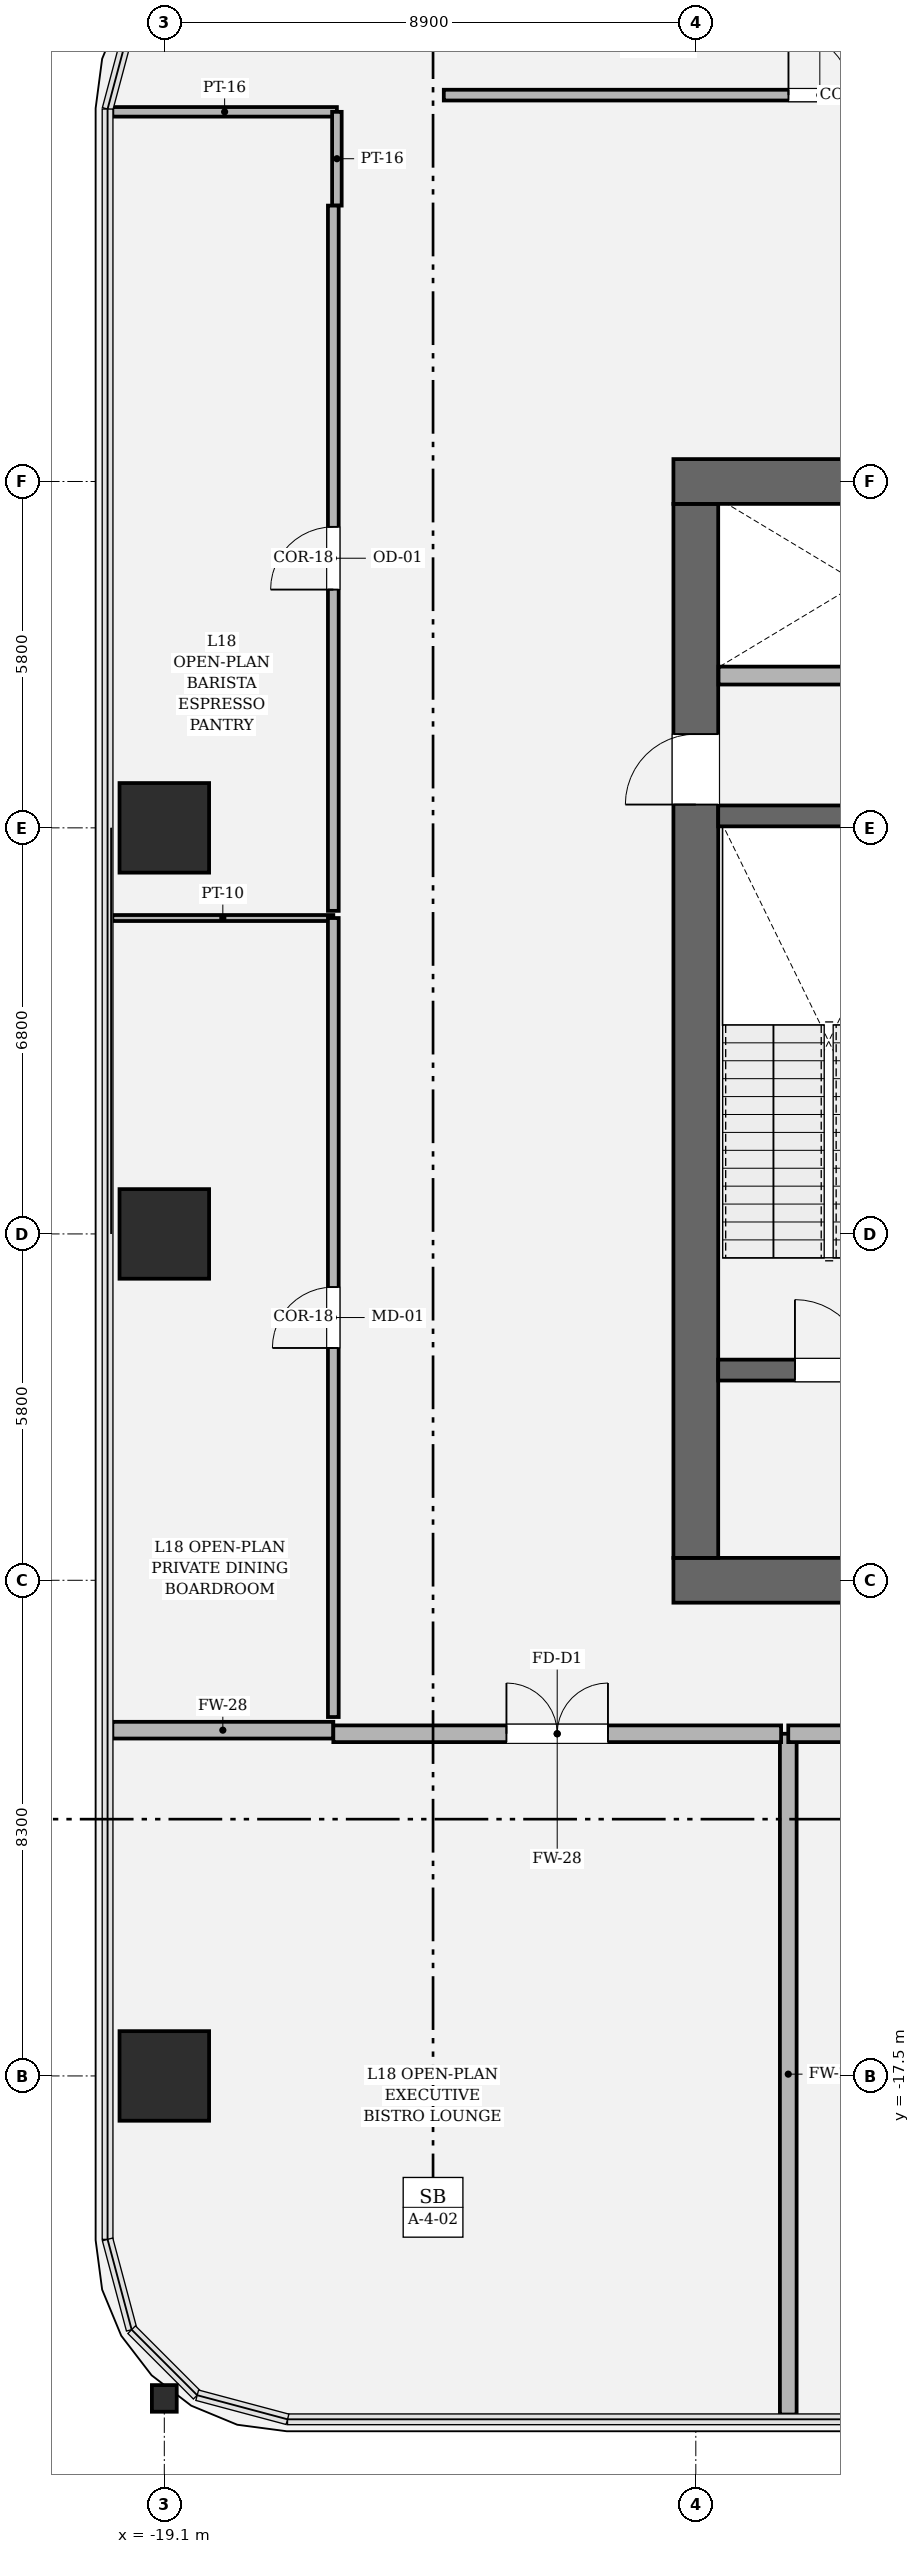
"""IFC4 building model, lengths in metres.
Left out: names, types, materials, properties, quantities, classifications, styles, units other than length and angle.
Written with IfcOpenShell. Run it as: python <this file> out.ifc"""

import sys

from ifc_helpers import new_model, si_unit, direction, frame, frame_2d, origin, origin_2d, place, context, subcontext, project, spatial, rectangle, hollow_rectangle, i_section, extrude, element, fill, save


model = new_model("IFC4")
c1 = context("Model", 3, precision=1e-05, world=origin(), true_north=direction((0.0, 1.0)))
c2 = subcontext(c1, "Body", "Model", "MODEL_VIEW")
j1 = project(units=[si_unit("LENGTHUNIT", "METRE"), si_unit("PLANEANGLEUNIT", "RADIAN")], contexts=[c1])
p1 = place(None, origin())
s1 = spatial("IfcSite", under=j1, at=p1, CompositionType="ELEMENT")
p2 = place(p1, origin())
s2 = spatial("IfcBuilding", under=s1, at=p2, CompositionType="ELEMENT")
p3 = place(p2, frame((0.0, 0.0, 80.85)))
s3 = spatial("IfcBuildingStorey", under=s2, at=p3, CompositionType="ELEMENT", Elevation=80.85)
p4 = place(p3, frame((10.575, -9.2, 0.0), z_axis=(0.0, 0.0, 1.0), x_axis=(-1.0, 0.0, 0.0)))
e1 = element("IfcWall", 1, at=p4, inside=s3, PredefinedType="SHEAR", context=c2, shape_type="SweptSolid", body=[
    extrude(rectangle(XDim=21.15, YDim=0.75, at=frame_2d((10.575, 0.0))), origin(), (0.0, 0.0, 1.0), 4.05),
])
p5 = place(p4, frame((2.85, 0.0, 0.0)))
e2 = element("IfcOpeningElement", 2, at=p5, cuts=e1, PredefinedType="OPENING", context=c2, shape_type="SweptSolid", body=[
    extrude(rectangle(XDim=1.25, YDim=2.25, at=frame_2d((0.625, 1.125))), frame((0.0, 0.385, 0.0), z_axis=(0.0, -1.0, 0.0), x_axis=(1.0, 0.0, 0.0)), (0.0, 0.0, 1.0), 0.77),
])
p6 = place(p4, frame((17.05, 0.0, 0.0)))
e3 = element("IfcOpeningElement", 3, at=p6, cuts=e1, PredefinedType="OPENING", context=c2, shape_type="SweptSolid", body=[
    extrude(rectangle(XDim=1.25, YDim=2.25, at=frame_2d((0.625, 1.125))), frame((0.0, 0.385, 0.0), z_axis=(0.0, -1.0, 0.0), x_axis=(1.0, 0.0, 0.0)), (0.0, 0.0, 1.0), 0.77),
])
p7 = place(p3, frame((-10.2, -8.825, 0.0), z_axis=(0.0, 0.0, 1.0), x_axis=(0.0, 1.0, 0.0)))
e4 = element("IfcWall", 4, at=p7, inside=s3, PredefinedType="SHEAR", context=c2, shape_type="SweptSolid", body=[
    extrude(rectangle(XDim=17.65, YDim=0.75, at=frame_2d((8.825, 0.0))), origin(), (0.0, 0.0, 1.0), 4.05),
])
p8 = place(p7, frame((12.615, 0.0, 0.0)))
e5 = element("IfcOpeningElement", 5, at=p8, cuts=e4, PredefinedType="OPENING", context=c2, shape_type="SweptSolid", body=[
    extrude(rectangle(XDim=1.18, YDim=2.2, at=frame_2d((0.59, 1.1))), frame((0.0, 0.385, 0.0), z_axis=(0.0, -1.0, 0.0), x_axis=(1.0, 0.0, 0.0)), (0.0, 0.0, 1.0), 0.77),
])
p9 = place(p3, frame((-10.575, 9.2, 0.0), z_axis=(0.0, 0.0, 1.0), x_axis=(1.0, 0.0, 0.0)))
e6 = element("IfcWall", 6, at=p9, inside=s3, PredefinedType="SHEAR", context=c2, shape_type="SweptSolid", body=[
    extrude(rectangle(XDim=21.15, YDim=0.75, at=frame_2d((10.575, 0.0))), origin(), (0.0, 0.0, 1.0), 4.05),
])
p10 = place(p3, frame((-9.825, -5.68, 0.0), z_axis=(0.0, 0.0, 1.0), x_axis=(1.0, 0.0, 0.0)))
e7 = element("IfcWall", 7, at=p10, inside=s3, PredefinedType="SOLIDWALL", context=c2, shape_type="SweptSolid", body=[
    extrude(rectangle(XDim=5.175, YDim=0.35, at=frame_2d((2.587, 0.0))), origin(), (0.0, 0.0, 1.0), 4.05),
])
p11 = place(p10, frame((1.285, 0.0, 0.0)))
e8 = element("IfcOpeningElement", 8, at=p11, cuts=e7, PredefinedType="OPENING", context=c2, shape_type="SweptSolid", body=[
    extrude(rectangle(XDim=1.18, YDim=2.2, at=frame_2d((0.59, 1.1))), frame((0.0, 0.185, 0.0), z_axis=(0.0, -1.0, 0.0), x_axis=(1.0, 0.0, 0.0)), (0.0, 0.0, 1.0), 0.37),
])
p12 = place(p3, frame((-9.825, 3.6, 0.0), z_axis=(0.0, 0.0, 1.0), x_axis=(1.0, 0.0, 0.0)))
e9 = element("IfcWall", 9, at=p12, inside=s3, PredefinedType="SOLIDWALL", context=c2, shape_type="SweptSolid", body=[
    extrude(rectangle(XDim=5.175, YDim=0.35, at=frame_2d((2.587, 0.0))), origin(), (0.0, 0.0, 1.0), 4.05),
])
for number, where, z_axis, x_axis in (
    (10, (-19.1, -17.5, 0.0), (0.0, 0.0, 1.0), (1.0, 0.0, 0.0)),
    (11, (-19.1, 3.4, 0.0), (0.0, 0.0, 1.0), (1.0, 0.0, 0.0)),
    (12, (-19.1, -3.4, 0.0), (0.0, 0.0, 1.0), (1.0, 0.0, 0.0)),
):
    element("IfcColumn", number, at=place(p3, frame(where, z_axis=z_axis, x_axis=x_axis)), inside=s3, PredefinedType="COLUMN", context=c2, shape_type="SweptSolid", body=[
        extrude(hollow_rectangle(XDim=1.5, YDim=1.5, WallThickness=0.045, at=origin_2d()), origin(), (0.0, 0.0, 1.0), 4.05),
    ])
p13 = place(p3, frame((-19.1, -22.9, 0.0), z_axis=(0.0, 0.0, 1.0), x_axis=(1.0, 0.0, 0.0)))
e13 = element("IfcColumn", 13, at=p13, inside=s3, PredefinedType="COLUMN", context=c2, shape_type="SweptSolid", body=[
    extrude(i_section(OverallWidth=0.416, OverallDepth=0.446, WebThickness=0.039, FlangeThickness=0.062, FilletRadius=0.018, at=origin_2d()), origin(), (0.0, 0.0, 1.0), 4.048),
])
p14 = place(p3, frame((-9.82, 5.95, 0.0), z_axis=(0.0, 0.0, 1.0), x_axis=(1.0, 0.0, 0.0)))
e14 = element("IfcWall", 14, at=p14, inside=s3, PredefinedType="SOLIDWALL", context=c2, shape_type="SweptSolid", body=[
    extrude(rectangle(XDim=4.76, YDim=0.3, at=frame_2d((2.38, 0.0))), origin(), (0.0, 0.0, 1.0), 3.81),
])
p15 = place(p3, frame((-8.652, -23.17, 0.0), z_axis=(0.0, 0.0, 1.0), x_axis=(0.0, 1.0, 0.0)))
e15 = element("IfcWall", 15, at=p15, inside=s3, PredefinedType="SOLIDWALL", context=c2, shape_type="SweptSolid", body=[
    extrude(rectangle(XDim=11.4, YDim=0.28, at=frame_2d((5.7, 0.0))), origin(), (0.0, 0.0, 1.0), 2.524),
])
p16 = place(p3, frame((-8.652, -11.77, 0.0), z_axis=(0.0, 0.0, 1.0), x_axis=(1.0, 0.0, 0.0)))
e16 = element("IfcWall", 16, at=p16, inside=s3, PredefinedType="SOLIDWALL", context=c2, shape_type="SweptSolid", body=[
    extrude(rectangle(XDim=13.77, YDim=0.28, at=frame_2d((6.885, 0.0))), origin(), (0.0, 0.0, 1.0), 3.104),
])
p17 = place(p16, frame((6.035, 0.0, 0.0)))
e17 = element("IfcOpeningElement", 17, at=p17, cuts=e16, PredefinedType="OPENING", context=c2, shape_type="SweptSolid", body=[
    extrude(rectangle(XDim=1.7, YDim=2.3, at=frame_2d((0.85, 1.15))), frame((0.0, 0.15, 0.0), z_axis=(0.0, -1.0, 0.0), x_axis=(1.0, 0.0, 0.0)), (0.0, 0.0, 1.0), 0.3),
])
p18 = place(p3, frame((-19.97, -11.71, 0.0), z_axis=(0.0, 0.0, 1.0), x_axis=(1.0, 0.0, 0.0)))
e18 = element("IfcWall", 18, at=p18, inside=s3, PredefinedType="SOLIDWALL", context=c2, shape_type="SweptSolid", body=[
    extrude(rectangle(XDim=3.7, YDim=0.28, at=frame_2d((1.85, 0.0))), origin(), (0.0, 0.0, 1.0), 3.104),
])
p19 = place(p3, frame((-16.27, -11.77, 0.0), z_axis=(0.0, 0.0, 1.0), x_axis=(1.0, 0.0, 0.0)))
e19 = element("IfcWall", 19, at=p19, inside=s3, PredefinedType="SOLIDWALL", context=c2, shape_type="SweptSolid", body=[
    extrude(rectangle(XDim=7.498, YDim=0.28, at=frame_2d((3.749, 0.0))), origin(), (0.0, 0.0, 1.0), 3.104),
])
p20 = place(p19, frame((2.899, 0.0, 0.0)))
e20 = element("IfcOpeningElement", 20, at=p20, cuts=e19, PredefinedType="OPENING", context=c2, shape_type="SweptSolid", body=[
    extrude(rectangle(XDim=1.7, YDim=2.3, at=frame_2d((0.85, 1.15))), frame((0.0, 0.15, 0.0), z_axis=(0.0, -1.0, 0.0), x_axis=(1.0, 0.0, 0.0)), (0.0, 0.0, 1.0), 0.3),
])
p21 = place(p3, frame((-19.97, 1.89, 0.0), z_axis=(0.0, 0.0, 1.0), x_axis=(1.0, 0.0, 0.0)))
e21 = element("IfcWall", 21, at=p21, inside=s3, PredefinedType="PARTITIONING", context=c2, shape_type="SweptSolid", body=[
    extrude(rectangle(XDim=3.7, YDim=0.1, at=frame_2d((1.85, 0.0))), origin(), (0.0, 0.0, 1.0), 3.104),
])
p22 = place(p3, frame((-16.27, 1.89, 0.0), z_axis=(0.0, 0.0, 1.0), x_axis=(0.0, -1.0, 0.0)))
e22 = element("IfcWall", 22, at=p22, inside=s3, PredefinedType="PARTITIONING", context=c2, shape_type="SweptSolid", body=[
    extrude(rectangle(XDim=13.38, YDim=0.18, at=frame_2d((6.69, 0.0))), origin(), (0.0, 0.0, 1.0), 3.104),
])
p23 = place(p22, frame((6.18, 0.0, 0.0)))
e23 = element("IfcOpeningElement", 23, at=p23, cuts=e22, PredefinedType="OPENING", context=c2, shape_type="SweptSolid", body=[
    extrude(rectangle(XDim=1.02, YDim=2.2, at=frame_2d((0.51, 1.1))), frame((0.0, 0.1, 0.0), z_axis=(0.0, -1.0, 0.0), x_axis=(1.0, 0.0, 0.0)), (0.0, 0.0, 1.0), 0.2),
])
p24 = place(p3, frame((-19.97, 15.39, 0.0), z_axis=(0.0, 0.0, 1.0), x_axis=(1.0, 0.0, 0.0)))
e24 = element("IfcWall", 24, at=p24, inside=s3, PredefinedType="PARTITIONING", context=c2, shape_type="SweptSolid", body=[
    extrude(rectangle(XDim=3.76, YDim=0.16, at=frame_2d((1.88, 0.0))), origin(), (0.0, 0.0, 1.0), 3.104),
])
p25 = place(p3, frame((-16.21, 15.39, 0.0), z_axis=(0.0, 0.0, 1.0), x_axis=(0.0, -1.0, 0.0)))
e25 = element("IfcWall", 25, at=p25, inside=s3, PredefinedType="PARTITIONING", context=c2, shape_type="SweptSolid", body=[
    extrude(rectangle(XDim=1.57, YDim=0.16, at=frame_2d((0.785, 0.0))), origin(), (0.0, 0.0, 1.0), 3.81),
])
p26 = place(p3, frame((-16.27, 13.82, 0.0), z_axis=(0.0, 0.0, 1.0), x_axis=(0.0, -1.0, 0.0)))
e26 = element("IfcWall", 26, at=p26, inside=s3, PredefinedType="PARTITIONING", context=c2, shape_type="SweptSolid", body=[
    extrude(rectangle(XDim=11.81, YDim=0.18, at=frame_2d((5.905, 0.0))), origin(), (0.0, 0.0, 1.0), 3.104),
])
p27 = place(p26, frame((5.38, 0.0, 0.0)))
e27 = element("IfcOpeningElement", 27, at=p27, cuts=e26, PredefinedType="OPENING", context=c2, shape_type="SweptSolid", body=[
    extrude(rectangle(XDim=1.05, YDim=2.2, at=frame_2d((0.525, 1.1))), frame((0.0, 0.1, 0.0), z_axis=(0.0, -1.0, 0.0), x_axis=(1.0, 0.0, 0.0)), (0.0, 0.0, 1.0), 0.2),
])
p28 = place(p3, frame((-1.827, 15.67, 0.0), z_axis=(0.0, 0.0, 1.0), x_axis=(-1.0, 0.0, 0.0)))
e28 = element("IfcWall", 28, at=p28, inside=s3, PredefinedType="PARTITIONING", context=c2, shape_type="SweptSolid", body=[
    extrude(rectangle(XDim=12.593, YDim=0.18, at=frame_2d((6.296, 0.0))), origin(), (0.0, 0.0, 1.0), 3.104),
])
p29 = place(p28, frame((5.771, 0.0, 0.0)))
e29 = element("IfcOpeningElement", 29, at=p29, cuts=e28, PredefinedType="OPENING", context=c2, shape_type="SweptSolid", body=[
    extrude(rectangle(XDim=1.05, YDim=2.2, at=frame_2d((0.525, 1.1))), frame((0.0, 0.1, 0.0), z_axis=(0.0, -1.0, 0.0), x_axis=(1.0, 0.0, 0.0)), (0.0, 0.0, 1.0), 0.2),
])
p30 = place(p11, origin())
e30 = element("IfcDoor", 30, at=p30, inside=s3, OperationType="SINGLE_SWING_LEFT", PredefinedType="DOOR", context=c2, shape_type="SweptSolid", body=[
    extrude(rectangle(XDim=1.18, YDim=2.2, at=frame_2d((0.59, 1.1))), frame((0.0, 0.025, 0.0), z_axis=(0.0, -1.0, 0.0), x_axis=(1.0, 0.0, 0.0)), (0.0, 0.0, 1.0), 0.05),
])
fill(e8, e30)
p31 = place(p8, origin())
e31 = element("IfcDoor", 31, at=p31, inside=s3, OperationType="SINGLE_SWING_LEFT", PredefinedType="DOOR", context=c2, shape_type="SweptSolid", body=[
    extrude(rectangle(XDim=1.18, YDim=2.2, at=frame_2d((0.59, 1.1))), frame((0.0, 0.025, 0.0), z_axis=(0.0, -1.0, 0.0), x_axis=(1.0, 0.0, 0.0)), (0.0, 0.0, 1.0), 0.05),
])
fill(e5, e31)
p32 = place(p20, origin())
e32 = element("IfcDoor", 32, at=p32, inside=s3, OperationType="DOUBLE_DOOR_SINGLE_SWING", PredefinedType="DOOR", context=c2, shape_type="SweptSolid", body=[
    extrude(rectangle(XDim=1.7, YDim=2.3, at=frame_2d((0.85, 1.15))), frame((0.0, 0.025, 0.0), z_axis=(0.0, -1.0, 0.0), x_axis=(1.0, 0.0, 0.0)), (0.0, 0.0, 1.0), 0.05),
])
fill(e20, e32)
p33 = place(p23, origin())
e33 = element("IfcDoor", 33, at=p33, inside=s3, OperationType="SINGLE_SWING_RIGHT", PredefinedType="DOOR", context=c2, shape_type="SweptSolid", body=[
    extrude(rectangle(XDim=1.02, YDim=2.2, at=frame_2d((0.51, 1.1))), frame((0.0, 0.025, 0.0), z_axis=(0.0, -1.0, 0.0), x_axis=(1.0, 0.0, 0.0)), (0.0, 0.0, 1.0), 0.05),
])
fill(e23, e33)
p34 = place(p27, origin())
e34 = element("IfcDoor", 34, at=p34, inside=s3, OperationType="SINGLE_SWING_RIGHT", PredefinedType="DOOR", context=c2, shape_type="SweptSolid", body=[
    extrude(rectangle(XDim=1.05, YDim=2.2, at=frame_2d((0.525, 1.1))), frame((0.0, 0.025, 0.0), z_axis=(0.0, -1.0, 0.0), x_axis=(1.0, 0.0, 0.0)), (0.0, 0.0, 1.0), 0.05),
])
fill(e27, e34)
p35 = place(p29, origin())
e35 = element("IfcDoor", 35, at=p35, inside=s3, OperationType="SINGLE_SWING_RIGHT", PredefinedType="DOOR", context=c2, shape_type="SweptSolid", body=[
    extrude(rectangle(XDim=1.05, YDim=2.2, at=frame_2d((0.525, 1.1))), frame((0.0, 0.025, 0.0), z_axis=(0.0, -1.0, 0.0), x_axis=(1.0, 0.0, 0.0)), (0.0, 0.0, 1.0), 0.05),
])
fill(e29, e35)
save(model, sys.argv[1])
